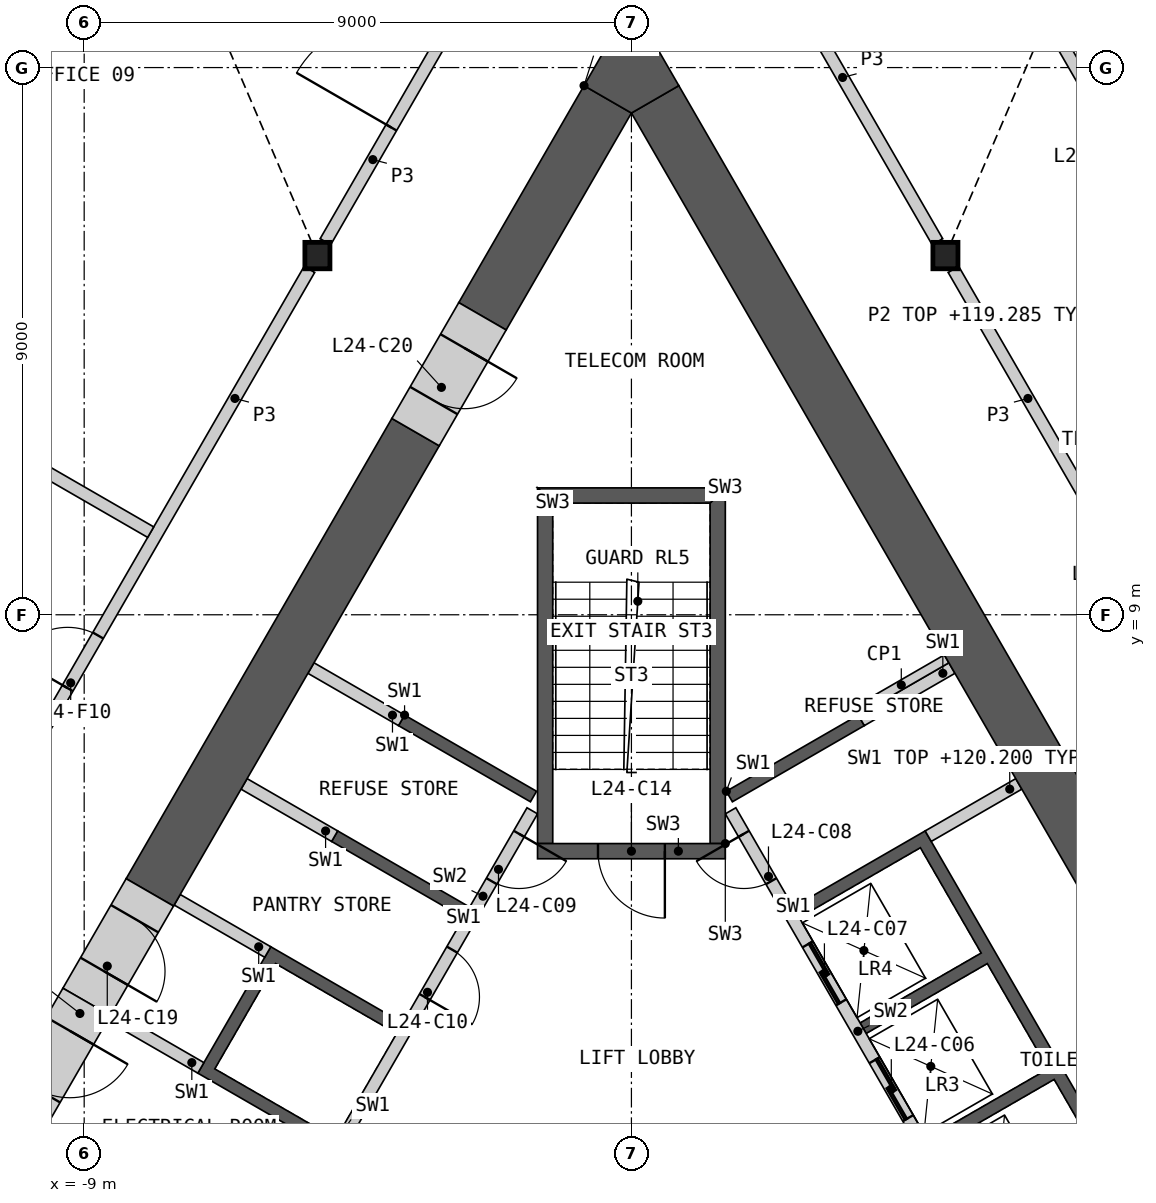
"""IFC4 building model, lengths in metres.
Left out: names, types, materials, properties, quantities, classifications, styles, units other than length and angle.
Written with IfcOpenShell. Run it as: python <this file> out.ifc"""

import sys

from ifc_helpers import new_model, si_unit, direction, frame, frame_2d, origin, origin_2d, place, context, subcontext, project, spatial, polyline, rectangle, i_section, outline, extrude, element, fill, save


model = new_model("IFC4")
c1 = context("Model", 3, precision=1e-05, world=origin(), true_north=direction((0.0, 1.0)))
c2 = subcontext(c1, "Body", "Model", "MODEL_VIEW")
j1 = project(units=[si_unit("LENGTHUNIT", "METRE"), si_unit("PLANEANGLEUNIT", "RADIAN")], contexts=[c1])
p1 = place(None, origin())
s1 = spatial("IfcSite", under=j1, at=p1, CompositionType="ELEMENT")
p2 = place(p1, origin())
s2 = spatial("IfcBuilding", under=s1, at=p2, CompositionType="ELEMENT")
p3 = place(p2, frame((0.0, 0.0, 116.4)))
s3 = spatial("IfcBuildingStorey", under=s2, at=p3, CompositionType="ELEMENT", Elevation=116.4)
for number, where, z_axis, x_axis in (
    (1, (-5.164, 14.908, 0.0), (0.0, 0.0, 1.0), (1.0, 0.0, 0.0)),
    (2, (5.164, 14.908, 0.0), (0.0, 0.0, 1.0), (1.0, 0.0, 0.0)),
):
    element("IfcColumn", number, at=place(p3, frame(where, z_axis=z_axis, x_axis=x_axis)), inside=s3, PredefinedType="COLUMN", context=c2, shape_type="SweptSolid", body=[
        extrude(i_section(OverallWidth=0.412, OverallDepth=0.435, WebThickness=0.036, FlangeThickness=0.057, at=origin_2d()), origin(), (0.0, 0.0, 1.0), 4.2),
    ])
p4 = place(p3, origin())
e3 = element("IfcWall", 3, at=p4, inside=s3, PredefinedType="SHEAR", context=c2, shape_type="SweptSolid", body=[
    extrude(outline(polyline([(1.561, 6.097), (3.731, 7.35), (3.831, 7.177), (1.66, 5.924), (1.561, 6.097)])), origin(), (0.0, 0.0, 1.0), 3.8),
])
p5 = place(p3, origin())
e4 = element("IfcWall", 4, at=p5, inside=s3, PredefinedType="SHEAR", context=c2, shape_type="SweptSolid", body=[
    extrude(outline(polyline([(2.66, 4.192), (4.831, 5.445), (8.231, -0.444), (6.061, -1.697), (5.96, -1.524), (7.952, -0.374), (6.952, 1.358), (4.96, 0.208), (4.861, 0.381), (6.852, 1.531), (5.852, 3.263), (3.861, 2.113), (3.76, 2.287), (5.752, 3.437), (4.752, 5.169), (2.76, 4.019), (2.66, 4.192)])), origin(), (0.0, 0.0, 1.0), 3.8),
])
p6 = place(p3, frame((5.817, -1.476, 0.0), z_axis=(0.0, 0.0, 1.0), x_axis=(-0.500002616675, 0.866023893041, 0.0)))
e5 = element("IfcWall", 5, at=p6, inside=s3, PredefinedType="SOLIDWALL", context=c2, shape_type="SweptSolid", body=[
    extrude(rectangle(XDim=8.373, YDim=0.2, at=frame_2d((4.187, 0.0))), origin(), (0.0, 0.0, 1.0), 3.8),
])
p7 = place(p6, frame((0.337, 0.0, 0.0)))
e6 = element("IfcOpeningElement", 6, at=p7, cuts=e5, PredefinedType="OPENING", context=c2, shape_type="SweptSolid", body=[
    extrude(rectangle(XDim=1.1, YDim=2.1, at=frame_2d((0.55, 1.05))), frame((0.0, 0.11, 0.0), z_axis=(0.0, -1.0, 0.0), x_axis=(1.0, 0.0, 0.0)), (0.0, 0.0, 1.0), 0.22),
])
p8 = place(p6, frame((2.537, 0.0, 0.0)))
e7 = element("IfcOpeningElement", 7, at=p8, cuts=e5, PredefinedType="OPENING", context=c2, shape_type="SweptSolid", body=[
    extrude(rectangle(XDim=1.1, YDim=2.1, at=frame_2d((0.55, 1.05))), frame((0.0, 0.11, 0.0), z_axis=(0.0, -1.0, 0.0), x_axis=(1.0, 0.0, 0.0)), (0.0, 0.0, 1.0), 0.22),
])
p9 = place(p6, frame((4.737, 0.0, 0.0)))
e8 = element("IfcOpeningElement", 8, at=p9, cuts=e5, PredefinedType="OPENING", context=c2, shape_type="SweptSolid", body=[
    extrude(rectangle(XDim=1.1, YDim=2.1, at=frame_2d((0.55, 1.05))), frame((0.0, 0.11, 0.0), z_axis=(0.0, -1.0, 0.0), x_axis=(1.0, 0.0, 0.0)), (0.0, 0.0, 1.0), 0.22),
])
p10 = place(p6, frame((7.037, 0.0, 0.0)))
e9 = element("IfcOpeningElement", 9, at=p10, cuts=e5, PredefinedType="OPENING", context=c2, shape_type="SweptSolid", body=[
    extrude(rectangle(XDim=0.9, YDim=2.1, at=frame_2d((0.45, 1.05))), frame((0.0, 0.11, 0.0), z_axis=(0.0, -1.0, 0.0), x_axis=(1.0, 0.0, 0.0)), (0.0, 0.0, 1.0), 0.22),
])
for number, where, z_axis, x_axis in (
    (10, (4.881, 5.358, 0.0), (0.0, 0.0, 1.0), (0.866, 0.5, 0.0)),
    (11, (3.781, 7.263, 0.0), (0.0, 0.0, 1.0), (0.866, 0.5, 0.0)),
):
    element("IfcWall", number, at=place(p3, frame(where, z_axis=z_axis, x_axis=x_axis)), inside=s3, PredefinedType="SHEAR", context=c2, shape_type="SweptSolid", body=[
        extrude(rectangle(XDim=1.72, YDim=0.2, at=frame_2d((0.86, 0.0))), origin(), (0.0, 0.0, 1.0), 3.8),
    ])
p11 = place(p3, origin())
e12 = element("IfcWall", 12, at=p11, inside=s3, PredefinedType="SHEAR", context=c2, shape_type="SweptSolid", body=[
    extrude(outline(polyline([(-4.96, 0.208), (-7.131, 1.461), (-5.931, 3.54), (-3.76, 2.287), (-3.861, 2.113), (-5.852, 3.263), (-6.852, 1.531), (-4.861, 0.381), (-4.96, 0.208)])), origin(), (0.0, 0.0, 1.0), 3.8),
])
p12 = place(p3, origin())
e13 = element("IfcWall", 13, at=p12, inside=s3, PredefinedType="SHEAR", context=c2, shape_type="SweptSolid", body=[
    extrude(outline(polyline([(-2.76, 4.019), (-4.931, 5.272), (-4.831, 5.445), (-2.66, 4.192), (-2.76, 4.019)])), origin(), (0.0, 0.0, 1.0), 3.8),
])
p13 = place(p3, origin())
e14 = element("IfcWall", 14, at=p13, inside=s3, PredefinedType="SHEAR", context=c2, shape_type="SweptSolid", body=[
    extrude(outline(polyline([(-3.731, 7.35), (-1.561, 6.097), (-1.66, 5.924), (-3.831, 7.177), (-3.731, 7.35)])), origin(), (0.0, 0.0, 1.0), 3.8),
])
p14 = place(p3, frame((-1.631, 5.776, 0.0), z_axis=(0.0, 0.0, 1.0), x_axis=(-0.499992876559, -0.866029516466, 0.0)))
e15 = element("IfcWall", 15, at=p14, inside=s3, PredefinedType="SOLIDWALL", context=c2, shape_type="SweptSolid", body=[
    extrude(rectangle(XDim=6.486, YDim=0.2, at=frame_2d((3.243, 0.0))), origin(), (0.0, 0.0, 1.0), 3.8),
])
p15 = place(p14, frame((0.437, 0.0, 0.0)))
e16 = element("IfcOpeningElement", 16, at=p15, cuts=e15, PredefinedType="OPENING", context=c2, shape_type="SweptSolid", body=[
    extrude(rectangle(XDim=0.9, YDim=2.1, at=frame_2d((0.45, 1.05))), frame((0.0, 0.11, 0.0), z_axis=(0.0, -1.0, 0.0), x_axis=(1.0, 0.0, 0.0)), (0.0, 0.0, 1.0), 0.22),
])
p16 = place(p14, frame((2.637, 0.0, 0.0)))
e17 = element("IfcOpeningElement", 17, at=p16, cuts=e15, PredefinedType="OPENING", context=c2, shape_type="SweptSolid", body=[
    extrude(rectangle(XDim=0.9, YDim=2.1, at=frame_2d((0.45, 1.05))), frame((0.0, 0.11, 0.0), z_axis=(0.0, -1.0, 0.0), x_axis=(1.0, 0.0, 0.0)), (0.0, 0.0, 1.0), 0.22),
])
for number, where, z_axis, x_axis in (
    (18, (-3.781, 7.263, 0.0), (0.0, 0.0, 1.0), (-0.866, 0.5, 0.0)),
    (19, (-4.881, 5.358, 0.0), (0.0, 0.0, 1.0), (-0.866, 0.5, 0.0)),
):
    element("IfcWall", number, at=place(p3, frame(where, z_axis=z_axis, x_axis=x_axis)), inside=s3, PredefinedType="SHEAR", context=c2, shape_type="SweptSolid", body=[
        extrude(rectangle(XDim=1.72, YDim=0.2, at=frame_2d((0.86, 0.0))), origin(), (0.0, 0.0, 1.0), 3.8),
    ])
p17 = place(p3, frame((-5.981, 3.453, 0.0), z_axis=(0.0, 0.0, 1.0), x_axis=(-0.866060346521, 0.499939472521, 0.0)))
e20 = element("IfcWall", 20, at=p17, inside=s3, PredefinedType="SHEAR", context=c2, shape_type="SweptSolid", body=[
    extrude(rectangle(XDim=1.72, YDim=0.2, at=frame_2d((0.86, 0.0))), origin(), (0.0, 0.0, 1.0), 3.8),
])
p18 = place(p3, frame((-7.081, 1.548, 0.0), z_axis=(0.0, 0.0, 1.0), x_axis=(-0.865963414263, 0.500107353632, 0.0)))
e21 = element("IfcWall", 21, at=p18, inside=s3, PredefinedType="SHEAR", context=c2, shape_type="SweptSolid", body=[
    extrude(rectangle(XDim=1.72, YDim=0.2, at=frame_2d((0.86, 0.0))), origin(), (0.0, 0.0, 1.0), 3.8),
])
p19 = place(p3, origin())
e22 = element("IfcWall", 22, at=p19, inside=s3, PredefinedType="SHEAR", context=c2, shape_type="SweptSolid", body=[
    extrude(outline(polyline([(1.544, 5.237), (1.544, 11.087), (1.294, 10.837), (1.294, 5.237), (1.544, 5.237)])), origin(), (0.0, 0.0, 1.0), 3.8),
])
p20 = place(p3, origin())
e23 = element("IfcWall", 23, at=p20, inside=s3, PredefinedType="SHEAR", context=c2, shape_type="SweptSolid", body=[
    extrude(outline(polyline([(1.544, 11.087), (-1.544, 11.087), (-1.294, 10.837), (1.294, 10.837), (1.544, 11.087)])), origin(), (0.0, 0.0, 1.0), 3.8),
])
p21 = place(p3, origin())
e24 = element("IfcWall", 24, at=p21, inside=s3, PredefinedType="SHEAR", context=c2, shape_type="SweptSolid", body=[
    extrude(outline(polyline([(-1.294, 10.837), (-1.544, 11.087), (-1.544, 5.237), (-1.294, 5.237), (-1.294, 10.837)])), origin(), (0.0, 0.0, 1.0), 3.8),
])
p22 = place(p3, frame((1.544, 5.112, 0.0), z_axis=(0.0, 0.0, 1.0), x_axis=(-1.0, 0.0, 0.0)))
e25 = element("IfcWall", 25, at=p22, inside=s3, PredefinedType="SHEAR", context=c2, shape_type="SweptSolid", body=[
    extrude(rectangle(XDim=3.088, YDim=0.25, at=frame_2d((1.544, 0.0))), origin(), (0.0, 0.0, 1.0), 3.8),
])
p23 = place(p22, frame((0.994, 0.0, 0.0)))
e26 = element("IfcOpeningElement", 26, at=p23, cuts=e25, PredefinedType="OPENING", context=c2, shape_type="SweptSolid", body=[
    extrude(rectangle(XDim=1.1, YDim=2.1, at=frame_2d((0.55, 1.05))), frame((0.0, 0.135, 0.0), z_axis=(0.0, -1.0, 0.0), x_axis=(1.0, 0.0, 0.0)), (0.0, 0.0, 1.0), 0.27),
])
p24 = place(p3, frame((3.693, 7.415, 0.0), z_axis=(0.0, 0.0, 1.0), x_axis=(0.866024871741, 0.500000921525, 0.0)))
e27 = element("IfcWall", 27, at=p24, inside=s3, PredefinedType="PARTITIONING", context=c2, shape_type="SweptSolid", body=[
    extrude(rectangle(XDim=1.72, YDim=0.15, at=frame_2d((0.86, 0.0))), origin(), (0.0, 0.0, 1.0), 3.8),
])
p25 = place(p3, frame((7.91, 4.451, 0.0), z_axis=(0.0, 0.0, 1.0), x_axis=(-0.500005799286, 0.866022055539, 0.0)))
e28 = element("IfcWall", 28, at=p25, inside=s3, PredefinedType="SHEAR", context=c2, shape_type="SweptSolid", body=[
    extrude(rectangle(XDim=15.041, YDim=0.9, at=frame_2d((7.521, 0.0))), origin(), (0.0, 0.0, 1.0), 3.8),
])
p26 = place(p3, frame((-3.55, 12.004, 0.0), z_axis=(0.0, 0.0, 1.0), x_axis=(-0.499993245289, -0.866029303583, 0.0)))
e29 = element("IfcWall", 29, at=p26, inside=s3, PredefinedType="SHEAR", context=c2, shape_type="SweptSolid", body=[
    extrude(rectangle(XDim=8.741, YDim=0.9, at=frame_2d((4.37, 0.0))), origin(), (0.0, 0.0, 1.0), 3.8),
])
p27 = place(p3, frame((-0.39, 17.478, 0.0), z_axis=(0.0, 0.0, 1.0), x_axis=(-0.50001992892, -0.866013897511, 0.0)))
e30 = element("IfcWall", 30, at=p27, inside=s3, PredefinedType="SHEAR", context=c2, shape_type="SweptSolid", body=[
    extrude(rectangle(XDim=4.12, YDim=0.9, at=frame_2d((2.06, 0.0))), origin(), (0.0, 0.0, 1.0), 3.8),
])
p28 = place(p3, origin())
e31 = element("IfcWall", 31, at=p28, inside=s3, PredefinedType="SHEAR", context=c2, shape_type="SweptSolid", body=[
    extrude(outline(polyline([(-0.779, 17.703), (0.0, 19.052), (0.779, 17.703), (0.0, 17.253), (-0.779, 17.703)])), origin(), (0.0, 0.0, 1.0), 3.8),
])
p29 = place(p3, frame((-7.92, 4.434, 0.0), z_axis=(0.0, 0.0, 1.0), x_axis=(-0.499939227269, -0.866060488094, 0.0)))
e32 = element("IfcWall", 32, at=p29, inside=s3, PredefinedType="SHEAR", context=c2, shape_type="SweptSolid", body=[
    extrude(rectangle(XDim=2.08, YDim=0.9, at=frame_2d((1.04, 0.0))), origin(), (0.0, 0.0, 1.0), 3.8),
])
p30 = place(p29, frame((0.5, 0.0, 0.0)))
e33 = element("IfcOpeningElement", 33, at=p30, cuts=e32, PredefinedType="OPENING", context=c2, shape_type="SweptSolid", body=[
    extrude(rectangle(XDim=1.0, YDim=2.1, at=frame_2d((0.5, 1.05))), frame((0.0, 0.46, 0.0), z_axis=(0.0, -1.0, 0.0), x_axis=(1.0, 0.0, 0.0)), (0.0, 0.0, 1.0), 0.92),
])
p31 = place(p3, frame((-2.45, 13.909, 0.0), z_axis=(0.0, 0.0, 1.0), x_axis=(-0.50002983664, -0.866008176907, 0.0)))
e34 = element("IfcWall", 34, at=p31, inside=s3, PredefinedType="SHEAR", context=c2, shape_type="SweptSolid", body=[
    extrude(rectangle(XDim=2.2, YDim=0.9, at=frame_2d((1.1, 0.0))), origin(), (0.0, 0.0, 1.0), 3.8),
])
p32 = place(p31, frame((0.6, 0.0, 0.0)))
e35 = element("IfcOpeningElement", 35, at=p32, cuts=e34, PredefinedType="OPENING", context=c2, shape_type="SweptSolid", body=[
    extrude(rectangle(XDim=1.0, YDim=2.1, at=frame_2d((0.5, 1.05))), frame((0.0, 0.46, 0.0), z_axis=(0.0, -1.0, 0.0), x_axis=(1.0, 0.0, 0.0)), (0.0, 0.0, 1.0), 0.92),
])
p33 = place(p3, frame((-8.96, 2.633, 0.0), z_axis=(0.0, 0.0, 1.0), x_axis=(-0.50002983664, -0.866008176907, 0.0)))
e36 = element("IfcWall", 36, at=p33, inside=s3, PredefinedType="SHEAR", context=c2, shape_type="SweptSolid", body=[
    extrude(rectangle(XDim=2.2, YDim=0.9, at=frame_2d((1.1, 0.0))), origin(), (0.0, 0.0, 1.0), 3.8),
])
p34 = place(p33, frame((0.55, 0.0, 0.0)))
e37 = element("IfcOpeningElement", 37, at=p34, cuts=e36, PredefinedType="OPENING", context=c2, shape_type="SweptSolid", body=[
    extrude(rectangle(XDim=1.1, YDim=2.1, at=frame_2d((0.55, 1.05))), frame((0.0, 0.46, 0.0), z_axis=(0.0, -1.0, 0.0), x_axis=(1.0, 0.0, 0.0)), (0.0, 0.0, 1.0), 0.92),
])
p35 = place(p3, frame((-10.197, 6.19, 0.0), z_axis=(0.0, 0.0, 1.0), x_axis=(0.500012035596, 0.866018454918, 0.0)))
e38 = element("IfcWall", 38, at=p35, inside=s3, PredefinedType="PARTITIONING", context=c2, shape_type="SweptSolid", body=[
    extrude(rectangle(XDim=9.803, YDim=0.2, at=frame_2d((4.902, 0.0))), origin(), (0.0, 0.0, 1.0), 3.8),
])
p36 = place(p35, frame((1.851, 0.0, 0.0)))
e39 = element("IfcOpeningElement", 39, at=p36, cuts=e38, PredefinedType="OPENING", context=c2, shape_type="SweptSolid", body=[
    extrude(rectangle(XDim=1.0, YDim=2.1, at=frame_2d((0.5, 1.05))), frame((0.0, 0.11, 0.0), z_axis=(0.0, -1.0, 0.0), x_axis=(1.0, 0.0, 0.0)), (0.0, 0.0, 1.0), 0.22),
])
p37 = place(p3, frame((5.295, 14.68, 0.0), z_axis=(0.0, 0.0, 1.0), x_axis=(0.500012035596, -0.866018454918, 0.0)))
e40 = element("IfcWall", 40, at=p37, inside=s3, PredefinedType="PARTITIONING", context=c2, shape_type="SweptSolid", body=[
    extrude(rectangle(XDim=9.803, YDim=0.2, at=frame_2d((4.902, 0.0))), origin(), (0.0, 0.0, 1.0), 3.8),
])
p38 = place(p37, frame((4.376, 0.0, 0.0)))
e41 = element("IfcOpeningElement", 41, at=p38, cuts=e40, PredefinedType="OPENING", context=c2, shape_type="SweptSolid", body=[
    extrude(rectangle(XDim=0.95, YDim=2.1, at=frame_2d((0.475, 1.05))), frame((0.0, 0.11, 0.0), z_axis=(0.0, -1.0, 0.0), x_axis=(1.0, 0.0, 0.0)), (0.0, 0.0, 1.0), 0.22),
])
p39 = place(p3, frame((-5.033, 15.135, 0.0), z_axis=(0.0, 0.0, 1.0), x_axis=(0.499980978912, 0.866036385336, 0.0)))
e42 = element("IfcWall", 42, at=p39, inside=s3, PredefinedType="PARTITIONING", context=c2, shape_type="SweptSolid", body=[
    extrude(rectangle(XDim=6.24, YDim=0.2, at=frame_2d((3.12, 0.0))), origin(), (0.0, 0.0, 1.0), 3.8),
])
p40 = place(p39, frame((2.169, 0.0, 0.0)))
e43 = element("IfcOpeningElement", 43, at=p40, cuts=e42, PredefinedType="OPENING", context=c2, shape_type="SweptSolid", body=[
    extrude(rectangle(XDim=1.8, YDim=2.1, at=frame_2d((0.9, 1.05))), frame((0.0, 0.11, 0.0), z_axis=(0.0, -1.0, 0.0), x_axis=(1.0, 0.0, 0.0)), (0.0, 0.0, 1.0), 0.22),
])
p41 = place(p3, frame((1.913, 20.539, 0.0), z_axis=(0.0, 0.0, 1.0), x_axis=(0.499980978912, -0.866036385336, 0.0)))
e44 = element("IfcWall", 44, at=p41, inside=s3, PredefinedType="PARTITIONING", context=c2, shape_type="SweptSolid", body=[
    extrude(rectangle(XDim=6.24, YDim=0.2, at=frame_2d((3.12, 0.0))), origin(), (0.0, 0.0, 1.0), 3.8),
])
p42 = place(p3, frame((4.548, 22.775, 0.0), z_axis=(0.0, 0.0, 1.0), x_axis=(0.499999764473, -0.866025539766, 0.0)))
e45 = element("IfcWall", 45, at=p42, inside=s3, PredefinedType="PARTITIONING", context=c2, shape_type="SweptSolid", body=[
    extrude(rectangle(XDim=17.35, YDim=0.2, at=frame_2d((8.675, 0.0))), origin(), (0.0, 0.0, 1.0), 2.885),
])
p43 = place(p42, frame((7.65, 0.0, 0.0)))
e46 = element("IfcOpeningElement", 46, at=p43, cuts=e45, PredefinedType="OPENING", context=c2, shape_type="SweptSolid", body=[
    extrude(rectangle(XDim=0.95, YDim=2.1, at=frame_2d((0.475, 1.05))), frame((0.0, 0.11, 0.0), z_axis=(0.0, -1.0, 0.0), x_axis=(1.0, 0.0, 0.0)), (0.0, 0.0, 1.0), 0.22),
])
p44 = place(p3, frame((-15.01, 14.46, 0.0), z_axis=(0.0, 0.0, 1.0), x_axis=(0.86602003489, -0.500009299083, 0.0)))
e47 = element("IfcWall", 47, at=p44, inside=s3, PredefinedType="PARTITIONING", context=c2, shape_type="SweptSolid", body=[
    extrude(rectangle(XDim=8.202, YDim=0.2, at=frame_2d((4.101, 0.0))), origin(), (0.0, 0.0, 1.0), 2.885),
])
p45 = place(p8, origin())
e48 = element("IfcDoor", 48, at=p45, inside=s3, OperationType="SLIDING_TO_LEFT", PredefinedType="DOOR", context=c2, shape_type="SweptSolid", body=[
    extrude(rectangle(XDim=1.1, YDim=2.1, at=frame_2d((0.55, 1.05))), frame((0.0, 0.025, 0.0), z_axis=(0.0, -1.0, 0.0), x_axis=(1.0, 0.0, 0.0)), (0.0, 0.0, 1.0), 0.05),
])
fill(e7, e48)
p46 = place(p9, origin())
e49 = element("IfcDoor", 49, at=p46, inside=s3, OperationType="SLIDING_TO_LEFT", PredefinedType="DOOR", context=c2, shape_type="SweptSolid", body=[
    extrude(rectangle(XDim=1.1, YDim=2.1, at=frame_2d((0.55, 1.05))), frame((0.0, 0.025, 0.0), z_axis=(0.0, -1.0, 0.0), x_axis=(1.0, 0.0, 0.0)), (0.0, 0.0, 1.0), 0.05),
])
fill(e8, e49)
p47 = place(p10, origin())
e50 = element("IfcDoor", 50, at=p47, inside=s3, OperationType="SINGLE_SWING_RIGHT", PredefinedType="DOOR", context=c2, shape_type="SweptSolid", body=[
    extrude(rectangle(XDim=0.9, YDim=2.1, at=frame_2d((0.45, 1.05))), frame((0.0, 0.025, 0.0), z_axis=(0.0, -1.0, 0.0), x_axis=(1.0, 0.0, 0.0)), (0.0, 0.0, 1.0), 0.05),
])
fill(e9, e50)
p48 = place(p15, origin())
e51 = element("IfcDoor", 51, at=p48, inside=s3, OperationType="SINGLE_SWING_LEFT", PredefinedType="DOOR", context=c2, shape_type="SweptSolid", body=[
    extrude(rectangle(XDim=0.9, YDim=2.1, at=frame_2d((0.45, 1.05))), frame((0.0, 0.025, 0.0), z_axis=(0.0, -1.0, 0.0), x_axis=(1.0, 0.0, 0.0)), (0.0, 0.0, 1.0), 0.05),
])
fill(e16, e51)
p49 = place(p16, origin())
e52 = element("IfcDoor", 52, at=p49, inside=s3, OperationType="SINGLE_SWING_RIGHT", PredefinedType="DOOR", context=c2, shape_type="SweptSolid", body=[
    extrude(rectangle(XDim=0.9, YDim=2.1, at=frame_2d((0.45, 1.05))), frame((0.0, 0.025, 0.0), z_axis=(0.0, -1.0, 0.0), x_axis=(1.0, 0.0, 0.0)), (0.0, 0.0, 1.0), 0.05),
])
fill(e17, e52)
p50 = place(p23, origin())
e53 = element("IfcDoor", 53, at=p50, inside=s3, OperationType="SINGLE_SWING_LEFT", PredefinedType="DOOR", context=c2, shape_type="SweptSolid", body=[
    extrude(rectangle(XDim=1.1, YDim=2.1, at=frame_2d((0.55, 1.05))), frame((0.0, 0.025, 0.0), z_axis=(0.0, -1.0, 0.0), x_axis=(1.0, 0.0, 0.0)), (0.0, 0.0, 1.0), 0.05),
])
fill(e26, e53)
p51 = place(p30, origin())
e54 = element("IfcDoor", 54, at=p51, inside=s3, OperationType="SINGLE_SWING_RIGHT", PredefinedType="DOOR", context=c2, shape_type="SweptSolid", body=[
    extrude(rectangle(XDim=1.0, YDim=2.1, at=frame_2d((0.5, 1.05))), frame((0.0, 0.205, 0.0), z_axis=(0.0, -1.0, 0.0), x_axis=(1.0, 0.0, 0.0)), (0.0, 0.0, 1.0), 0.05),
])
fill(e33, e54)
p52 = place(p32, origin())
e55 = element("IfcDoor", 55, at=p52, inside=s3, OperationType="SINGLE_SWING_LEFT", PredefinedType="DOOR", context=c2, shape_type="SweptSolid", body=[
    extrude(rectangle(XDim=1.0, YDim=2.1, at=frame_2d((0.5, 1.05))), frame((0.0, 0.205, 0.0), z_axis=(0.0, -1.0, 0.0), x_axis=(1.0, 0.0, 0.0)), (0.0, 0.0, 1.0), 0.05),
])
fill(e35, e55)
p53 = place(p34, origin())
e56 = element("IfcDoor", 56, at=p53, inside=s3, OperationType="SINGLE_SWING_LEFT", PredefinedType="DOOR", context=c2, shape_type="SweptSolid", body=[
    extrude(rectangle(XDim=1.1, YDim=2.1, at=frame_2d((0.55, 1.05))), frame((0.0, 0.205, 0.0), z_axis=(0.0, -1.0, 0.0), x_axis=(1.0, 0.0, 0.0)), (0.0, 0.0, 1.0), 0.05),
])
fill(e37, e56)
p54 = place(p40, origin())
e57 = element("IfcDoor", 57, at=p54, inside=s3, OperationType="DOUBLE_DOOR_SINGLE_SWING", PredefinedType="DOOR", context=c2, shape_type="SweptSolid", body=[
    extrude(rectangle(XDim=1.8, YDim=2.1, at=frame_2d((0.9, 1.05))), frame((0.0, 0.025, 0.0), z_axis=(0.0, -1.0, 0.0), x_axis=(1.0, 0.0, 0.0)), (0.0, 0.0, 1.0), 0.05),
])
fill(e43, e57)
p55 = place(p36, origin())
e58 = element("IfcDoor", 58, at=p55, inside=s3, OperationType="SINGLE_SWING_LEFT", PredefinedType="DOOR", context=c2, shape_type="SweptSolid", body=[
    extrude(rectangle(XDim=1.0, YDim=2.1, at=frame_2d((0.5, 1.05))), frame((0.0, 0.025, 0.0), z_axis=(0.0, -1.0, 0.0), x_axis=(1.0, 0.0, 0.0)), (0.0, 0.0, 1.0), 0.05),
])
fill(e39, e58)
save(model, sys.argv[1])
